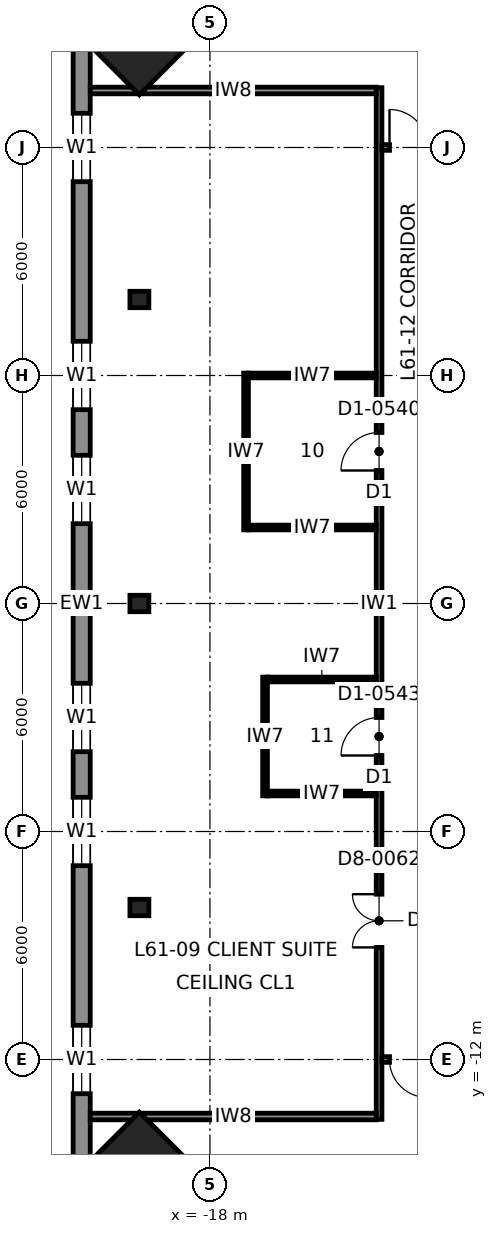
"""IFC4 building model, lengths in metres.
Left out: names, types, materials, properties, quantities, classifications, styles, units other than length and angle.
Written with IfcOpenShell. Run it as: python <this file> out.ifc"""

import sys

from ifc_helpers import new_model, si_unit, direction, frame, frame_2d, origin, origin_2d, place, context, subcontext, project, spatial, rectangle, i_section, extrude, element, fill, save


model = new_model("IFC4")
c1 = context("Model", 3, precision=1e-05, world=origin(), true_north=direction((0.0, 1.0)))
c2 = subcontext(c1, "Body", "Model", "MODEL_VIEW")
j1 = project(units=[si_unit("LENGTHUNIT", "METRE"), si_unit("PLANEANGLEUNIT", "RADIAN")], contexts=[c1])
p1 = place(None, origin())
s1 = spatial("IfcSite", under=j1, at=p1, CompositionType="ELEMENT")
p2 = place(p1, origin())
s2 = spatial("IfcBuilding", under=s1, at=p2, CompositionType="ELEMENT")
p3 = place(p2, frame((0.0, 0.0, 273.8)))
s3 = spatial("IfcBuildingStorey", under=s2, at=p3, CompositionType="ELEMENT", Elevation=273.8)
for number, where, z_axis, x_axis in (
    (1, (-19.856, -15.506, 0.0), (0.04, 0.04, 0.998), (-0.707, 0.708, 0.0)),
    (2, (-19.856, 15.506, 0.0), (0.04, -0.04, 0.998), (0.707, 0.708, 0.0)),
):
    element("IfcColumn", number, at=place(p3, frame(where, z_axis=z_axis, x_axis=x_axis)), inside=s3, PredefinedType="COLUMN", context=c2, shape_type="SweptSolid", body=[
        extrude(rectangle(XDim=3.0, YDim=3.0, at=origin_2d()), origin(), (0.0, 0.0, 1.0), 4.007),
    ])
for number, where, z_axis, x_axis in (
    (3, (-19.856, 0.0, 0.0), (0.04, 0.0, 0.999), (0.0, 1.0, 0.0)),
    (4, (-19.856, 8.0, 0.0), (0.04, 0.0, 0.999), (0.0, 1.0, 0.0)),
    (5, (-19.856, -8.0, 0.0), (0.04, 0.0, 0.999), (0.0, 1.0, 0.0)),
):
    element("IfcColumn", number, at=place(p3, frame(where, z_axis=z_axis, x_axis=x_axis)), inside=s3, PredefinedType="COLUMN", context=c2, shape_type="SweptSolid", body=[
        extrude(i_section(OverallWidth=0.432, OverallDepth=0.498, WebThickness=0.056, FlangeThickness=0.089, at=origin_2d()), origin(), (0.0, 0.0, 1.0), 4.003),
    ])
p4 = place(p3, frame((-21.375, 17.1, 0.0), z_axis=(0.0, 0.0, 1.0), x_axis=(0.0, -1.0, 0.0)))
e6 = element("IfcWall", 6, at=p4, inside=s3, PredefinedType="SOLIDWALL", context=c2, shape_type="SweptSolid", body=[
    extrude(rectangle(XDim=34.2, YDim=0.45, at=frame_2d((17.1, 0.0))), origin(), (0.0, 0.0, 1.0), 3.83),
])
p5 = place(p4, frame((4.2, 0.0, 0.7)))
e7 = element("IfcOpeningElement", 7, at=p5, cuts=e6, PredefinedType="OPENING", context=c2, shape_type="SweptSolid", body=[
    extrude(rectangle(XDim=1.8, YDim=2.6, at=frame_2d((0.9, 1.3))), frame((0.0, 0.235, 0.0), z_axis=(0.0, -1.0, 0.0), x_axis=(1.0, 0.0, 0.0)), (0.0, 0.0, 1.0), 0.47),
])
p6 = place(p4, frame((10.2, 0.0, 0.7)))
e8 = element("IfcOpeningElement", 8, at=p6, cuts=e6, PredefinedType="OPENING", context=c2, shape_type="SweptSolid", body=[
    extrude(rectangle(XDim=1.8, YDim=2.6, at=frame_2d((0.9, 1.3))), frame((0.0, 0.235, 0.0), z_axis=(0.0, -1.0, 0.0), x_axis=(1.0, 0.0, 0.0)), (0.0, 0.0, 1.0), 0.47),
])
p7 = place(p4, frame((13.2, 0.0, 0.7)))
e9 = element("IfcOpeningElement", 9, at=p7, cuts=e6, PredefinedType="OPENING", context=c2, shape_type="SweptSolid", body=[
    extrude(rectangle(XDim=1.8, YDim=2.6, at=frame_2d((0.9, 1.3))), frame((0.0, 0.235, 0.0), z_axis=(0.0, -1.0, 0.0), x_axis=(1.0, 0.0, 0.0)), (0.0, 0.0, 1.0), 0.47),
])
p8 = place(p4, frame((19.2, 0.0, 0.7)))
e10 = element("IfcOpeningElement", 10, at=p8, cuts=e6, PredefinedType="OPENING", context=c2, shape_type="SweptSolid", body=[
    extrude(rectangle(XDim=1.8, YDim=2.6, at=frame_2d((0.9, 1.3))), frame((0.0, 0.235, 0.0), z_axis=(0.0, -1.0, 0.0), x_axis=(1.0, 0.0, 0.0)), (0.0, 0.0, 1.0), 0.47),
])
p9 = place(p4, frame((22.2, 0.0, 0.7)))
e11 = element("IfcOpeningElement", 11, at=p9, cuts=e6, PredefinedType="OPENING", context=c2, shape_type="SweptSolid", body=[
    extrude(rectangle(XDim=1.8, YDim=2.6, at=frame_2d((0.9, 1.3))), frame((0.0, 0.235, 0.0), z_axis=(0.0, -1.0, 0.0), x_axis=(1.0, 0.0, 0.0)), (0.0, 0.0, 1.0), 0.47),
])
p10 = place(p4, frame((28.2, 0.0, 0.7)))
e12 = element("IfcOpeningElement", 12, at=p10, cuts=e6, PredefinedType="OPENING", context=c2, shape_type="SweptSolid", body=[
    extrude(rectangle(XDim=1.8, YDim=2.6, at=frame_2d((0.9, 1.3))), frame((0.0, 0.235, 0.0), z_axis=(0.0, -1.0, 0.0), x_axis=(1.0, 0.0, 0.0)), (0.0, 0.0, 1.0), 0.47),
])
p11 = place(p3, frame((-13.55, 13.575, 0.0), z_axis=(0.0, 0.0, 1.0), x_axis=(0.0, -1.0, 0.0)))
e13 = element("IfcWall", 13, at=p11, inside=s3, PredefinedType="PARTITIONING", context=c2, shape_type="SweptSolid", body=[
    extrude(rectangle(XDim=27.15, YDim=0.15, at=frame_2d((13.575, 0.0))), origin(), (0.0, 0.0, 1.0), 3.83),
])
p12 = place(p11, frame((21.225, 0.0, 0.0)))
e14 = element("IfcOpeningElement", 14, at=p12, cuts=e13, PredefinedType="OPENING", context=c2, shape_type="SweptSolid", body=[
    extrude(rectangle(XDim=1.4, YDim=2.3, at=frame_2d((0.7, 1.15))), frame((0.0, 0.085, 0.0), z_axis=(0.0, -1.0, 0.0), x_axis=(1.0, 0.0, 0.0)), (0.0, 0.0, 1.0), 0.17),
])
p13 = place(p11, frame((9.075, 0.0, 0.0)))
e15 = element("IfcOpeningElement", 15, at=p13, cuts=e13, PredefinedType="OPENING", context=c2, shape_type="SweptSolid", body=[
    extrude(rectangle(XDim=1.0, YDim=2.3, at=frame_2d((0.5, 1.15))), frame((0.0, 0.085, 0.0), z_axis=(0.0, -1.0, 0.0), x_axis=(1.0, 0.0, 0.0)), (0.0, 0.0, 1.0), 0.17),
])
p14 = place(p11, frame((16.575, 0.0, 0.0)))
e16 = element("IfcOpeningElement", 16, at=p14, cuts=e13, PredefinedType="OPENING", context=c2, shape_type="SweptSolid", body=[
    extrude(rectangle(XDim=1.0, YDim=2.3, at=frame_2d((0.5, 1.15))), frame((0.0, 0.085, 0.0), z_axis=(0.0, -1.0, 0.0), x_axis=(1.0, 0.0, 0.0)), (0.0, 0.0, 1.0), 0.17),
])
p15 = place(p3, frame((-13.475, 12.0, 0.0), z_axis=(0.0, 0.0, 1.0), x_axis=(1.0, 0.0, 0.0)))
e17 = element("IfcWall", 17, at=p15, inside=s3, PredefinedType="PARTITIONING", context=c2, shape_type="SweptSolid", body=[
    extrude(rectangle(XDim=1.475, YDim=0.15, at=frame_2d((0.738, 0.0))), origin(), (0.0, 0.0, 1.0), 3.83),
])
p16 = place(p15, frame((0.2, 0.0, 0.0)))
e18 = element("IfcOpeningElement", 18, at=p16, cuts=e17, PredefinedType="OPENING", context=c2, shape_type="SweptSolid", body=[
    extrude(rectangle(XDim=1.0, YDim=2.3, at=frame_2d((0.5, 1.15))), frame((0.0, 0.085, 0.0), z_axis=(0.0, -1.0, 0.0), x_axis=(1.0, 0.0, 0.0)), (0.0, 0.0, 1.0), 0.17),
])
p17 = place(p3, frame((-12.0, -12.0, 0.0), z_axis=(0.0, 0.0, 1.0), x_axis=(-1.0, 0.0, 0.0)))
e19 = element("IfcWall", 19, at=p17, inside=s3, PredefinedType="PARTITIONING", context=c2, shape_type="SweptSolid", body=[
    extrude(rectangle(XDim=1.475, YDim=0.15, at=frame_2d((0.738, 0.0))), origin(), (0.0, 0.0, 1.0), 3.83),
])
p18 = place(p17, frame((0.275, 0.0, 0.0)))
e20 = element("IfcOpeningElement", 20, at=p18, cuts=e19, PredefinedType="OPENING", context=c2, shape_type="SweptSolid", body=[
    extrude(rectangle(XDim=1.0, YDim=2.3, at=frame_2d((0.5, 1.15))), frame((0.0, 0.085, 0.0), z_axis=(0.0, -1.0, 0.0), x_axis=(1.0, 0.0, 0.0)), (0.0, 0.0, 1.0), 0.17),
])
for number, where, z_axis, x_axis in (
    (21, (-21.15, 13.5, 0.0), (0.0, 0.0, 1.0), (1.0, 0.0, 0.0)),
    (22, (-13.625, -13.5, 0.0), (0.0, 0.0, 1.0), (-1.0, 0.0, 0.0)),
):
    element("IfcWall", number, at=place(p3, frame(where, z_axis=z_axis, x_axis=x_axis)), inside=s3, PredefinedType="PARTITIONING", context=c2, shape_type="SweptSolid", body=[
        extrude(rectangle(XDim=7.525, YDim=0.175, at=frame_2d((3.762, 0.0))), origin(), (0.0, 0.0, 1.0), 3.83),
    ])
p19 = place(p3, frame((-17.05, 1.938, 0.0), z_axis=(0.0, 0.0, 1.0), x_axis=(0.0, 1.0, 0.0)))
e23 = element("IfcWall", 23, at=p19, inside=s3, PredefinedType="PARTITIONING", context=c2, shape_type="SweptSolid", body=[
    extrude(rectangle(XDim=4.125, YDim=0.125, at=frame_2d((2.062, 0.0))), origin(), (0.0, 0.0, 1.0), 3.83),
])
for number, where, z_axis, x_axis in (
    (24, (-13.625, 2.0, 0.0), (0.0, 0.0, 1.0), (-1.0, 0.0, 0.0)),
    (25, (-13.625, 6.0, 0.0), (0.0, 0.0, 1.0), (-1.0, 0.0, 0.0)),
):
    element("IfcWall", number, at=place(p3, frame(where, z_axis=z_axis, x_axis=x_axis)), inside=s3, PredefinedType="PARTITIONING", context=c2, shape_type="SweptSolid", body=[
        extrude(rectangle(XDim=3.363, YDim=0.125, at=frame_2d((1.681, 0.0))), origin(), (0.0, 0.0, 1.0), 3.83),
    ])
p20 = place(p3, frame((-16.55, -5.062, 0.0), z_axis=(0.0, 0.0, 1.0), x_axis=(0.0, 1.0, 0.0)))
e26 = element("IfcWall", 26, at=p20, inside=s3, PredefinedType="PARTITIONING", context=c2, shape_type="SweptSolid", body=[
    extrude(rectangle(XDim=3.125, YDim=0.125, at=frame_2d((1.562, 0.0))), origin(), (0.0, 0.0, 1.0), 3.83),
])
for number, where, z_axis, x_axis in (
    (27, (-13.625, -5.0, 0.0), (0.0, 0.0, 1.0), (-1.0, 0.0, 0.0)),
    (28, (-13.625, -2.0, 0.0), (0.0, 0.0, 1.0), (-1.0, 0.0, 0.0)),
):
    element("IfcWall", number, at=place(p3, frame(where, z_axis=z_axis, x_axis=x_axis)), inside=s3, PredefinedType="PARTITIONING", context=c2, shape_type="SweptSolid", body=[
        extrude(rectangle(XDim=2.863, YDim=0.125, at=frame_2d((1.431, 0.0))), origin(), (0.0, 0.0, 1.0), 3.83),
    ])
p21 = place(p5, origin())
e29 = element("IfcWindow", 29, at=p21, inside=s3, PartitioningType="SINGLE_PANEL", PredefinedType="WINDOW", context=c2, shape_type="SweptSolid", body=[
    extrude(rectangle(XDim=1.8, YDim=2.6, at=frame_2d((0.9, 1.3))), frame((0.0, 0.03, 0.0), z_axis=(0.0, -1.0, 0.0), x_axis=(1.0, 0.0, 0.0)), (0.0, 0.0, 1.0), 0.06),
])
fill(e7, e29)
p22 = place(p6, origin())
e30 = element("IfcWindow", 30, at=p22, inside=s3, PartitioningType="SINGLE_PANEL", PredefinedType="WINDOW", context=c2, shape_type="SweptSolid", body=[
    extrude(rectangle(XDim=1.8, YDim=2.6, at=frame_2d((0.9, 1.3))), frame((0.0, 0.03, 0.0), z_axis=(0.0, -1.0, 0.0), x_axis=(1.0, 0.0, 0.0)), (0.0, 0.0, 1.0), 0.06),
])
fill(e8, e30)
p23 = place(p7, origin())
e31 = element("IfcWindow", 31, at=p23, inside=s3, PartitioningType="SINGLE_PANEL", PredefinedType="WINDOW", context=c2, shape_type="SweptSolid", body=[
    extrude(rectangle(XDim=1.8, YDim=2.6, at=frame_2d((0.9, 1.3))), frame((0.0, 0.03, 0.0), z_axis=(0.0, -1.0, 0.0), x_axis=(1.0, 0.0, 0.0)), (0.0, 0.0, 1.0), 0.06),
])
fill(e9, e31)
p24 = place(p8, origin())
e32 = element("IfcWindow", 32, at=p24, inside=s3, PartitioningType="SINGLE_PANEL", PredefinedType="WINDOW", context=c2, shape_type="SweptSolid", body=[
    extrude(rectangle(XDim=1.8, YDim=2.6, at=frame_2d((0.9, 1.3))), frame((0.0, 0.03, 0.0), z_axis=(0.0, -1.0, 0.0), x_axis=(1.0, 0.0, 0.0)), (0.0, 0.0, 1.0), 0.06),
])
fill(e10, e32)
p25 = place(p9, origin())
e33 = element("IfcWindow", 33, at=p25, inside=s3, PartitioningType="SINGLE_PANEL", PredefinedType="WINDOW", context=c2, shape_type="SweptSolid", body=[
    extrude(rectangle(XDim=1.8, YDim=2.6, at=frame_2d((0.9, 1.3))), frame((0.0, 0.03, 0.0), z_axis=(0.0, -1.0, 0.0), x_axis=(1.0, 0.0, 0.0)), (0.0, 0.0, 1.0), 0.06),
])
fill(e11, e33)
p26 = place(p10, origin())
e34 = element("IfcWindow", 34, at=p26, inside=s3, PartitioningType="SINGLE_PANEL", PredefinedType="WINDOW", context=c2, shape_type="SweptSolid", body=[
    extrude(rectangle(XDim=1.8, YDim=2.6, at=frame_2d((0.9, 1.3))), frame((0.0, 0.03, 0.0), z_axis=(0.0, -1.0, 0.0), x_axis=(1.0, 0.0, 0.0)), (0.0, 0.0, 1.0), 0.06),
])
fill(e12, e34)
p27 = place(p16, origin())
e35 = element("IfcDoor", 35, at=p27, inside=s3, OperationType="SINGLE_SWING_LEFT", PredefinedType="DOOR", context=c2, shape_type="SweptSolid", body=[
    extrude(rectangle(XDim=1.0, YDim=2.3, at=frame_2d((0.5, 1.15))), frame((0.0, 0.025, 0.0), z_axis=(0.0, -1.0, 0.0), x_axis=(1.0, 0.0, 0.0)), (0.0, 0.0, 1.0), 0.05),
])
fill(e18, e35)
p28 = place(p18, origin())
e36 = element("IfcDoor", 36, at=p28, inside=s3, OperationType="SINGLE_SWING_LEFT", PredefinedType="DOOR", context=c2, shape_type="SweptSolid", body=[
    extrude(rectangle(XDim=1.0, YDim=2.3, at=frame_2d((0.5, 1.15))), frame((0.0, 0.025, 0.0), z_axis=(0.0, -1.0, 0.0), x_axis=(1.0, 0.0, 0.0)), (0.0, 0.0, 1.0), 0.05),
])
fill(e20, e36)
p29 = place(p12, frame((1.4, 0.0, 0.0), z_axis=(0.0, 0.0, 1.0), x_axis=(-1.0, 0.0, 0.0)))
e37 = element("IfcDoor", 37, at=p29, inside=s3, OperationType="DOUBLE_DOOR_SINGLE_SWING", PredefinedType="DOOR", context=c2, shape_type="SweptSolid", body=[
    extrude(rectangle(XDim=1.4, YDim=2.3, at=frame_2d((0.7, 1.15))), frame((0.0, 0.025, 0.0), z_axis=(0.0, -1.0, 0.0), x_axis=(1.0, 0.0, 0.0)), (0.0, 0.0, 1.0), 0.05),
])
fill(e14, e37)
p30 = place(p13, frame((1.0, 0.0, 0.0), z_axis=(0.0, 0.0, 1.0), x_axis=(-1.0, 0.0, 0.0)))
e38 = element("IfcDoor", 38, at=p30, inside=s3, OperationType="SINGLE_SWING_LEFT", PredefinedType="DOOR", context=c2, shape_type="SweptSolid", body=[
    extrude(rectangle(XDim=1.0, YDim=2.3, at=frame_2d((0.5, 1.15))), frame((0.0, 0.025, 0.0), z_axis=(0.0, -1.0, 0.0), x_axis=(1.0, 0.0, 0.0)), (0.0, 0.0, 1.0), 0.05),
])
fill(e15, e38)
p31 = place(p14, frame((1.0, 0.0, 0.0), z_axis=(0.0, 0.0, 1.0), x_axis=(-1.0, 0.0, 0.0)))
e39 = element("IfcDoor", 39, at=p31, inside=s3, OperationType="SINGLE_SWING_LEFT", PredefinedType="DOOR", context=c2, shape_type="SweptSolid", body=[
    extrude(rectangle(XDim=1.0, YDim=2.3, at=frame_2d((0.5, 1.15))), frame((0.0, 0.025, 0.0), z_axis=(0.0, -1.0, 0.0), x_axis=(1.0, 0.0, 0.0)), (0.0, 0.0, 1.0), 0.05),
])
fill(e16, e39)
save(model, sys.argv[1])
